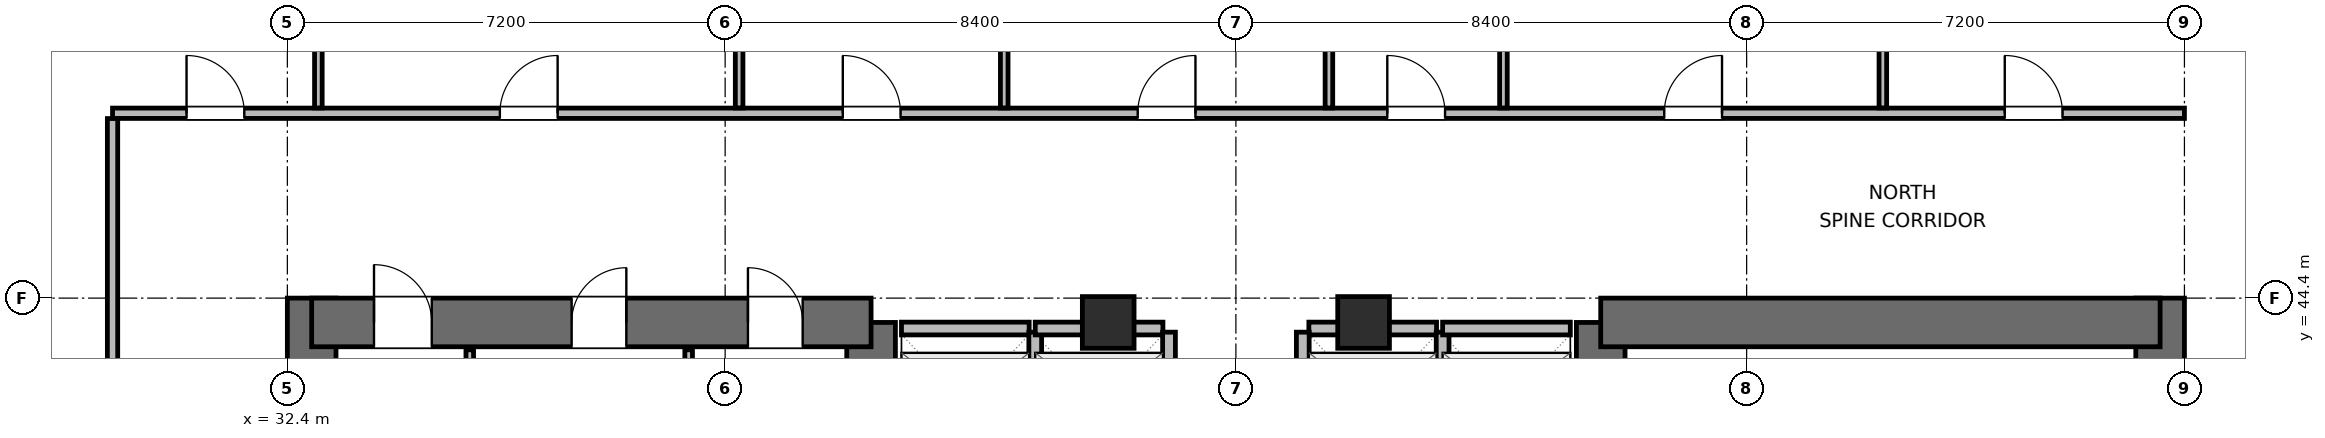
"""IFC4 building model, lengths in metres.
Left out: names, types, materials, properties, quantities, classifications, styles, units other than length and angle.
Written with IfcOpenShell. Run it as: python <this file> out.ifc"""

import sys

from ifc_helpers import new_model, si_unit, direction, frame, frame_2d, origin, origin_2d, place, context, subcontext, project, spatial, rectangle, extrude, element, fill, save


model = new_model("IFC4")
c1 = context("Model", 3, precision=1e-05, world=origin(), true_north=direction((0.0, 1.0)))
c2 = subcontext(c1, "Body", "Model", "MODEL_VIEW")
j1 = project(units=[si_unit("LENGTHUNIT", "METRE"), si_unit("PLANEANGLEUNIT", "RADIAN")], contexts=[c1])
p1 = place(None, origin())
s1 = spatial("IfcSite", under=j1, at=p1, CompositionType="ELEMENT")
p2 = place(p1, origin())
s2 = spatial("IfcBuilding", under=s1, at=p2, CompositionType="ELEMENT")
p3 = place(p2, frame((0.0, 0.0, 177.9)))
s3 = spatial("IfcBuildingStorey", under=s2, at=p3, CompositionType="ELEMENT", Elevation=177.9)
p4 = place(p3, frame((32.8, 27.6, 0.0), z_axis=(0.0, 0.0, 1.0), x_axis=(0.0, 1.0, 0.0)))
e1 = element("IfcWall", 1, at=p4, inside=s3, PredefinedType="SHEAR", context=c2, shape_type="SweptSolid", body=[
    extrude(rectangle(XDim=16.8, YDim=0.8, at=frame_2d((8.4, 0.0))), origin(), (0.0, 0.0, 1.0), 3.9),
])
p5 = place(p3, frame((42.0, 37.8, 0.0), z_axis=(0.0, 0.0, 1.0), x_axis=(0.0, 1.0, 0.0)))
e2 = element("IfcWall", 2, at=p5, inside=s3, PredefinedType="SHEAR", context=c2, shape_type="SweptSolid", body=[
    extrude(rectangle(XDim=6.2, YDim=0.8, at=frame_2d((3.1, 0.0))), origin(), (0.0, 0.0, 1.0), 3.9),
])
p6 = place(p3, frame((32.8, 44.0, 0.0), z_axis=(0.0, 0.0, 1.0), x_axis=(1.0, 0.0, 0.0)))
e3 = element("IfcWall", 3, at=p6, inside=s3, PredefinedType="SHEAR", context=c2, shape_type="SweptSolid", body=[
    extrude(rectangle(XDim=9.2, YDim=0.8, at=frame_2d((4.6, 0.0))), origin(), (0.0, 0.0, 1.0), 3.9),
])
p7 = place(p6, frame((1.025, 0.0, 0.0)))
e4 = element("IfcOpeningElement", 4, at=p7, cuts=e3, PredefinedType="OPENING", context=c2, shape_type="SweptSolid", body=[
    extrude(rectangle(XDim=0.95, YDim=2.04, at=frame_2d((0.475, 1.02))), frame((0.0, 0.41, 0.0), z_axis=(0.0, -1.0, 0.0), x_axis=(1.0, 0.0, 0.0)), (0.0, 0.0, 1.0), 0.82),
])
p8 = place(p6, frame((4.275, 0.0, 0.0)))
e5 = element("IfcOpeningElement", 5, at=p8, cuts=e3, PredefinedType="OPENING", context=c2, shape_type="SweptSolid", body=[
    extrude(rectangle(XDim=0.9, YDim=2.02, at=frame_2d((0.45, 1.01))), frame((0.0, 0.41, 0.0), z_axis=(0.0, -1.0, 0.0), x_axis=(1.0, 0.0, 0.0)), (0.0, 0.0, 1.0), 0.82),
])
p9 = place(p6, frame((7.175, 0.0, 0.0)))
e6 = element("IfcOpeningElement", 6, at=p9, cuts=e3, PredefinedType="OPENING", context=c2, shape_type="SweptSolid", body=[
    extrude(rectangle(XDim=0.9, YDim=2.02, at=frame_2d((0.45, 1.01))), frame((0.0, 0.41, 0.0), z_axis=(0.0, -1.0, 0.0), x_axis=(1.0, 0.0, 0.0)), (0.0, 0.0, 1.0), 0.82),
])
p10 = place(p3, frame((54.0, 38.0, 0.0), z_axis=(0.0, 0.0, 1.0), x_axis=(0.0, 1.0, 0.0)))
e7 = element("IfcWall", 7, at=p10, inside=s3, PredefinedType="SHEAR", context=c2, shape_type="SweptSolid", body=[
    extrude(rectangle(XDim=6.0, YDim=0.8, at=frame_2d((3.0, 0.0))), origin(), (0.0, 0.0, 1.0), 3.9),
])
p11 = place(p3, frame((63.2, 27.6, 0.0), z_axis=(0.0, 0.0, 1.0), x_axis=(0.0, 1.0, 0.0)))
e8 = element("IfcWall", 8, at=p11, inside=s3, PredefinedType="SHEAR", context=c2, shape_type="SweptSolid", body=[
    extrude(rectangle(XDim=16.8, YDim=0.8, at=frame_2d((8.4, 0.0))), origin(), (0.0, 0.0, 1.0), 3.9),
])
p12 = place(p3, frame((54.0, 44.0, 0.0), z_axis=(0.0, 0.0, 1.0), x_axis=(1.0, 0.0, 0.0)))
e9 = element("IfcWall", 9, at=p12, inside=s3, PredefinedType="SHEAR", context=c2, shape_type="SweptSolid", body=[
    extrude(rectangle(XDim=9.2, YDim=0.8, at=frame_2d((4.6, 0.0))), origin(), (0.0, 0.0, 1.0), 3.9),
])
for number, where, z_axis, x_axis in (
    (10, (45.9, 44.0, 0.0), (0.0, 0.0, 1.0), (1.0, 0.0, 0.0)),
    (11, (50.1, 44.0, 0.0), (0.0, 0.0, 1.0), (1.0, 0.0, 0.0)),
):
    element("IfcColumn", number, at=place(p3, frame(where, z_axis=z_axis, x_axis=x_axis)), inside=s3, PredefinedType="COLUMN", context=c2, shape_type="SweptSolid", body=[
        extrude(rectangle(XDim=0.85, YDim=0.85, at=origin_2d()), origin(), (0.0, 0.0, 1.0), 3.9),
    ])
for number, where, z_axis, x_axis in (
    (12, (35.4, 41.095, 0.0), (0.0, 0.0, 1.0), (0.0, 1.0, 0.0)),
    (13, (39.0, 41.095, 0.0), (0.0, 0.0, 1.0), (0.0, 1.0, 0.0)),
):
    element("IfcWall", number, at=place(p3, frame(where, z_axis=z_axis, x_axis=x_axis)), inside=s3, PredefinedType="PARTITIONING", context=c2, shape_type="SweptSolid", body=[
        extrude(rectangle(XDim=2.455, YDim=0.125, at=frame_2d((1.228, 0.0))), origin(), (0.0, 0.0, 1.0), 3.68),
    ])
p13 = place(p3, frame((42.5, 43.9, 0.0), z_axis=(0.0, 0.0, 1.0), x_axis=(1.0, 0.0, 0.0)))
e14 = element("IfcWall", 14, at=p13, inside=s3, PredefinedType="PARTITIONING", context=c2, shape_type="SweptSolid", body=[
    extrude(rectangle(XDim=2.1, YDim=0.21, at=frame_2d((1.05, 0.0))), origin(), (0.0, 0.0, 1.0), 2.765),
])
p14 = place(p3, frame((44.7, 41.56, 0.0), z_axis=(0.0, 0.0, 1.0), x_axis=(0.0, 1.0, 0.0)))
e15 = element("IfcWall", 15, at=p14, inside=s3, PredefinedType="PARTITIONING", context=c2, shape_type="SweptSolid", body=[
    extrude(rectangle(XDim=2.28, YDim=0.21, at=frame_2d((1.14, 0.0))), origin(), (0.0, 0.0, 1.0), 3.68),
])
p15 = place(p3, frame((44.7, 43.9, 0.0), z_axis=(0.0, 0.0, 1.0), x_axis=(1.0, 0.0, 0.0)))
e16 = element("IfcWall", 16, at=p15, inside=s3, PredefinedType="PARTITIONING", context=c2, shape_type="SweptSolid", body=[
    extrude(rectangle(XDim=2.1, YDim=0.21, at=frame_2d((1.05, 0.0))), origin(), (0.0, 0.0, 1.0), 2.765),
])
p16 = place(p3, frame((46.9, 41.56, 0.0), z_axis=(0.0, 0.0, 1.0), x_axis=(0.0, 1.0, 0.0)))
e17 = element("IfcWall", 17, at=p16, inside=s3, PredefinedType="PARTITIONING", context=c2, shape_type="SweptSolid", body=[
    extrude(rectangle(XDim=2.28, YDim=0.21, at=frame_2d((1.14, 0.0))), origin(), (0.0, 0.0, 1.0), 3.68),
])
p17 = place(p3, frame((49.2, 43.9, 0.0), z_axis=(0.0, 0.0, 1.0), x_axis=(1.0, 0.0, 0.0)))
e18 = element("IfcWall", 18, at=p17, inside=s3, PredefinedType="PARTITIONING", context=c2, shape_type="SweptSolid", body=[
    extrude(rectangle(XDim=2.1, YDim=0.21, at=frame_2d((1.05, 0.0))), origin(), (0.0, 0.0, 1.0), 2.765),
])
for number, where, z_axis, x_axis in (
    (19, (49.1, 41.56, 0.0), (0.0, 0.0, 1.0), (0.0, 1.0, 0.0)),
    (20, (51.4, 41.56, 0.0), (0.0, 0.0, 1.0), (0.0, 1.0, 0.0)),
):
    element("IfcWall", number, at=place(p3, frame(where, z_axis=z_axis, x_axis=x_axis)), inside=s3, PredefinedType="PARTITIONING", context=c2, shape_type="SweptSolid", body=[
        extrude(rectangle(XDim=2.28, YDim=0.21, at=frame_2d((1.14, 0.0))), origin(), (0.0, 0.0, 1.0), 3.68),
    ])
p18 = place(p3, frame((51.4, 43.9, 0.0), z_axis=(0.0, 0.0, 1.0), x_axis=(1.0, 0.0, 0.0)))
e21 = element("IfcWall", 21, at=p18, inside=s3, PredefinedType="PARTITIONING", context=c2, shape_type="SweptSolid", body=[
    extrude(rectangle(XDim=2.1, YDim=0.21, at=frame_2d((1.05, 0.0))), origin(), (0.0, 0.0, 1.0), 2.765),
])
p19 = place(p3, frame((29.525, 47.44, 0.0), z_axis=(0.0, 0.0, 1.0), x_axis=(1.0, 0.0, 0.0)))
e22 = element("IfcWall", 22, at=p19, inside=s3, PredefinedType="PARTITIONING", context=c2, shape_type="SweptSolid", body=[
    extrude(rectangle(XDim=34.075, YDim=0.17, at=frame_2d((17.038, 0.0))), origin(), (0.0, 0.0, 1.0), 3.68),
])
p20 = place(p19, frame((1.217, 0.0, 0.0)))
e23 = element("IfcOpeningElement", 23, at=p20, cuts=e22, PredefinedType="OPENING", context=c2, shape_type="SweptSolid", body=[
    extrude(rectangle(XDim=0.95, YDim=2.04, at=frame_2d((0.475, 1.02))), frame((0.0, 0.095, 0.0), z_axis=(0.0, -1.0, 0.0), x_axis=(1.0, 0.0, 0.0)), (0.0, 0.0, 1.0), 0.19),
])
p21 = place(p19, frame((6.37, 0.0, 0.0)))
e24 = element("IfcOpeningElement", 24, at=p21, cuts=e22, PredefinedType="OPENING", context=c2, shape_type="SweptSolid", body=[
    extrude(rectangle(XDim=0.95, YDim=2.04, at=frame_2d((0.475, 1.02))), frame((0.0, 0.095, 0.0), z_axis=(0.0, -1.0, 0.0), x_axis=(1.0, 0.0, 0.0)), (0.0, 0.0, 1.0), 0.19),
])
p22 = place(p19, frame((12.01, 0.0, 0.0)))
e25 = element("IfcOpeningElement", 25, at=p22, cuts=e22, PredefinedType="OPENING", context=c2, shape_type="SweptSolid", body=[
    extrude(rectangle(XDim=0.95, YDim=2.04, at=frame_2d((0.475, 1.02))), frame((0.0, 0.095, 0.0), z_axis=(0.0, -1.0, 0.0), x_axis=(1.0, 0.0, 0.0)), (0.0, 0.0, 1.0), 0.19),
])
p23 = place(p19, frame((16.86, 0.0, 0.0)))
e26 = element("IfcOpeningElement", 26, at=p23, cuts=e22, PredefinedType="OPENING", context=c2, shape_type="SweptSolid", body=[
    extrude(rectangle(XDim=0.95, YDim=2.04, at=frame_2d((0.475, 1.02))), frame((0.0, 0.095, 0.0), z_axis=(0.0, -1.0, 0.0), x_axis=(1.0, 0.0, 0.0)), (0.0, 0.0, 1.0), 0.19),
])
p24 = place(p19, frame((20.965, 0.0, 0.0)))
e27 = element("IfcOpeningElement", 27, at=p24, cuts=e22, PredefinedType="OPENING", context=c2, shape_type="SweptSolid", body=[
    extrude(rectangle(XDim=0.95, YDim=2.04, at=frame_2d((0.475, 1.02))), frame((0.0, 0.095, 0.0), z_axis=(0.0, -1.0, 0.0), x_axis=(1.0, 0.0, 0.0)), (0.0, 0.0, 1.0), 0.19),
])
p25 = place(p19, frame((25.52, 0.0, 0.0)))
e28 = element("IfcOpeningElement", 28, at=p25, cuts=e22, PredefinedType="OPENING", context=c2, shape_type="SweptSolid", body=[
    extrude(rectangle(XDim=0.95, YDim=2.04, at=frame_2d((0.475, 1.02))), frame((0.0, 0.095, 0.0), z_axis=(0.0, -1.0, 0.0), x_axis=(1.0, 0.0, 0.0)), (0.0, 0.0, 1.0), 0.19),
])
p26 = place(p19, frame((31.12, 0.0, 0.0)))
e29 = element("IfcOpeningElement", 29, at=p26, cuts=e22, PredefinedType="OPENING", context=c2, shape_type="SweptSolid", body=[
    extrude(rectangle(XDim=0.95, YDim=2.04, at=frame_2d((0.475, 1.02))), frame((0.0, 0.095, 0.0), z_axis=(0.0, -1.0, 0.0), x_axis=(1.0, 0.0, 0.0)), (0.0, 0.0, 1.0), 0.19),
])
p27 = place(p3, frame((29.525, 37.1, 0.0), z_axis=(0.0, 0.0, 1.0), x_axis=(0.0, 1.0, 0.0)))
e30 = element("IfcWall", 30, at=p27, inside=s3, PredefinedType="PARTITIONING", context=c2, shape_type="SweptSolid", body=[
    extrude(rectangle(XDim=10.253, YDim=0.17, at=frame_2d((5.126, 0.0))), origin(), (0.0, 0.0, 1.0), 3.68),
])
p28 = place(p27, frame((4.695, 0.0, 0.0)))
e31 = element("IfcOpeningElement", 31, at=p28, cuts=e30, PredefinedType="OPENING", context=c2, shape_type="SweptSolid", body=[
    extrude(rectangle(XDim=0.95, YDim=2.04, at=frame_2d((0.475, 1.02))), frame((0.0, 0.095, 0.0), z_axis=(0.0, -1.0, 0.0), x_axis=(1.0, 0.0, 0.0)), (0.0, 0.0, 1.0), 0.19),
])
p29 = place(p3, frame((32.91, 47.527, 0.0), z_axis=(0.0, 0.0, 1.0), x_axis=(0.0, 1.0, 0.0)))
e32 = element("IfcWall", 32, at=p29, inside=s3, PredefinedType="PARTITIONING", context=c2, shape_type="SweptSolid", body=[
    extrude(rectangle(XDim=14.638, YDim=0.125, at=frame_2d((7.319, 0.0))), origin(), (0.0, 0.0, 1.0), 3.68),
])
p30 = place(p3, frame((39.83, 47.527, 0.0), z_axis=(0.0, 0.0, 1.0), x_axis=(0.0, 1.0, 0.0)))
e33 = element("IfcWall", 33, at=p30, inside=s3, PredefinedType="PARTITIONING", context=c2, shape_type="SweptSolid", body=[
    extrude(rectangle(XDim=14.638, YDim=0.125, at=frame_2d((7.319, 0.0))), origin(), (0.0, 0.0, 1.0), 3.043),
])
p31 = place(p3, frame((44.19, 47.527, 0.0), z_axis=(0.0, 0.0, 1.0), x_axis=(0.0, 1.0, 0.0)))
e34 = element("IfcWall", 34, at=p31, inside=s3, PredefinedType="PARTITIONING", context=c2, shape_type="SweptSolid", body=[
    extrude(rectangle(XDim=12.998, YDim=0.125, at=frame_2d((6.499, 0.0))), origin(), (0.0, 0.0, 1.0), 3.043),
])
p32 = place(p3, frame((49.53, 47.527, 0.0), z_axis=(0.0, 0.0, 1.0), x_axis=(0.0, 1.0, 0.0)))
e35 = element("IfcWall", 35, at=p32, inside=s3, PredefinedType="PARTITIONING", context=c2, shape_type="SweptSolid", body=[
    extrude(rectangle(XDim=10.918, YDim=0.125, at=frame_2d((5.459, 0.0))), origin(), (0.0, 0.0, 1.0), 3.68),
])
p33 = place(p3, frame((52.4, 47.527, 0.0), z_axis=(0.0, 0.0, 1.0), x_axis=(0.0, 1.0, 0.0)))
e36 = element("IfcWall", 36, at=p33, inside=s3, PredefinedType="PARTITIONING", context=c2, shape_type="SweptSolid", body=[
    extrude(rectangle(XDim=10.918, YDim=0.125, at=frame_2d((5.459, 0.0))), origin(), (0.0, 0.0, 1.0), 3.043),
])
p34 = place(p3, frame((58.64, 47.527, 0.0), z_axis=(0.0, 0.0, 1.0), x_axis=(0.0, 1.0, 0.0)))
e37 = element("IfcWall", 37, at=p34, inside=s3, PredefinedType="PARTITIONING", context=c2, shape_type="SweptSolid", body=[
    extrude(rectangle(XDim=14.598, YDim=0.125, at=frame_2d((7.299, 0.0))), origin(), (0.0, 0.0, 1.0), 3.68),
])
p35 = place(p7, origin())
e38 = element("IfcDoor", 38, at=p35, inside=s3, OperationType="SINGLE_SWING_LEFT", PredefinedType="DOOR", context=c2, shape_type="SweptSolid", body=[
    extrude(rectangle(XDim=0.95, YDim=2.04, at=frame_2d((0.475, 1.02))), frame((0.0, 0.025, 0.0), z_axis=(0.0, -1.0, 0.0), x_axis=(1.0, 0.0, 0.0)), (0.0, 0.0, 1.0), 0.05),
])
fill(e4, e38)
p36 = place(p8, origin())
e39 = element("IfcDoor", 39, at=p36, inside=s3, OperationType="SINGLE_SWING_RIGHT", PredefinedType="DOOR", context=c2, shape_type="SweptSolid", body=[
    extrude(rectangle(XDim=0.9, YDim=2.02, at=frame_2d((0.45, 1.01))), frame((0.0, 0.025, 0.0), z_axis=(0.0, -1.0, 0.0), x_axis=(1.0, 0.0, 0.0)), (0.0, 0.0, 1.0), 0.05),
])
fill(e5, e39)
p37 = place(p9, origin())
e40 = element("IfcDoor", 40, at=p37, inside=s3, OperationType="SINGLE_SWING_LEFT", PredefinedType="DOOR", context=c2, shape_type="SweptSolid", body=[
    extrude(rectangle(XDim=0.9, YDim=2.02, at=frame_2d((0.45, 1.01))), frame((0.0, 0.025, 0.0), z_axis=(0.0, -1.0, 0.0), x_axis=(1.0, 0.0, 0.0)), (0.0, 0.0, 1.0), 0.05),
])
fill(e6, e40)
p38 = place(p20, origin())
e41 = element("IfcDoor", 41, at=p38, inside=s3, OperationType="SINGLE_SWING_LEFT", PredefinedType="DOOR", context=c2, shape_type="SweptSolid", body=[
    extrude(rectangle(XDim=0.95, YDim=2.04, at=frame_2d((0.475, 1.02))), frame((0.0, 0.025, 0.0), z_axis=(0.0, -1.0, 0.0), x_axis=(1.0, 0.0, 0.0)), (0.0, 0.0, 1.0), 0.05),
])
fill(e23, e41)
p39 = place(p21, origin())
e42 = element("IfcDoor", 42, at=p39, inside=s3, OperationType="SINGLE_SWING_RIGHT", PredefinedType="DOOR", context=c2, shape_type="SweptSolid", body=[
    extrude(rectangle(XDim=0.95, YDim=2.04, at=frame_2d((0.475, 1.02))), frame((0.0, 0.025, 0.0), z_axis=(0.0, -1.0, 0.0), x_axis=(1.0, 0.0, 0.0)), (0.0, 0.0, 1.0), 0.05),
])
fill(e24, e42)
p40 = place(p22, origin())
e43 = element("IfcDoor", 43, at=p40, inside=s3, OperationType="SINGLE_SWING_LEFT", PredefinedType="DOOR", context=c2, shape_type="SweptSolid", body=[
    extrude(rectangle(XDim=0.95, YDim=2.04, at=frame_2d((0.475, 1.02))), frame((0.0, 0.025, 0.0), z_axis=(0.0, -1.0, 0.0), x_axis=(1.0, 0.0, 0.0)), (0.0, 0.0, 1.0), 0.05),
])
fill(e25, e43)
p41 = place(p23, origin())
e44 = element("IfcDoor", 44, at=p41, inside=s3, OperationType="SINGLE_SWING_RIGHT", PredefinedType="DOOR", context=c2, shape_type="SweptSolid", body=[
    extrude(rectangle(XDim=0.95, YDim=2.04, at=frame_2d((0.475, 1.02))), frame((0.0, 0.025, 0.0), z_axis=(0.0, -1.0, 0.0), x_axis=(1.0, 0.0, 0.0)), (0.0, 0.0, 1.0), 0.05),
])
fill(e26, e44)
p42 = place(p24, origin())
e45 = element("IfcDoor", 45, at=p42, inside=s3, OperationType="SINGLE_SWING_LEFT", PredefinedType="DOOR", context=c2, shape_type="SweptSolid", body=[
    extrude(rectangle(XDim=0.95, YDim=2.04, at=frame_2d((0.475, 1.02))), frame((0.0, 0.025, 0.0), z_axis=(0.0, -1.0, 0.0), x_axis=(1.0, 0.0, 0.0)), (0.0, 0.0, 1.0), 0.05),
])
fill(e27, e45)
p43 = place(p25, origin())
e46 = element("IfcDoor", 46, at=p43, inside=s3, OperationType="SINGLE_SWING_RIGHT", PredefinedType="DOOR", context=c2, shape_type="SweptSolid", body=[
    extrude(rectangle(XDim=0.95, YDim=2.04, at=frame_2d((0.475, 1.02))), frame((0.0, 0.025, 0.0), z_axis=(0.0, -1.0, 0.0), x_axis=(1.0, 0.0, 0.0)), (0.0, 0.0, 1.0), 0.05),
])
fill(e28, e46)
p44 = place(p26, origin())
e47 = element("IfcDoor", 47, at=p44, inside=s3, OperationType="SINGLE_SWING_LEFT", PredefinedType="DOOR", context=c2, shape_type="SweptSolid", body=[
    extrude(rectangle(XDim=0.95, YDim=2.04, at=frame_2d((0.475, 1.02))), frame((0.0, 0.025, 0.0), z_axis=(0.0, -1.0, 0.0), x_axis=(1.0, 0.0, 0.0)), (0.0, 0.0, 1.0), 0.05),
])
fill(e29, e47)
save(model, sys.argv[1])
